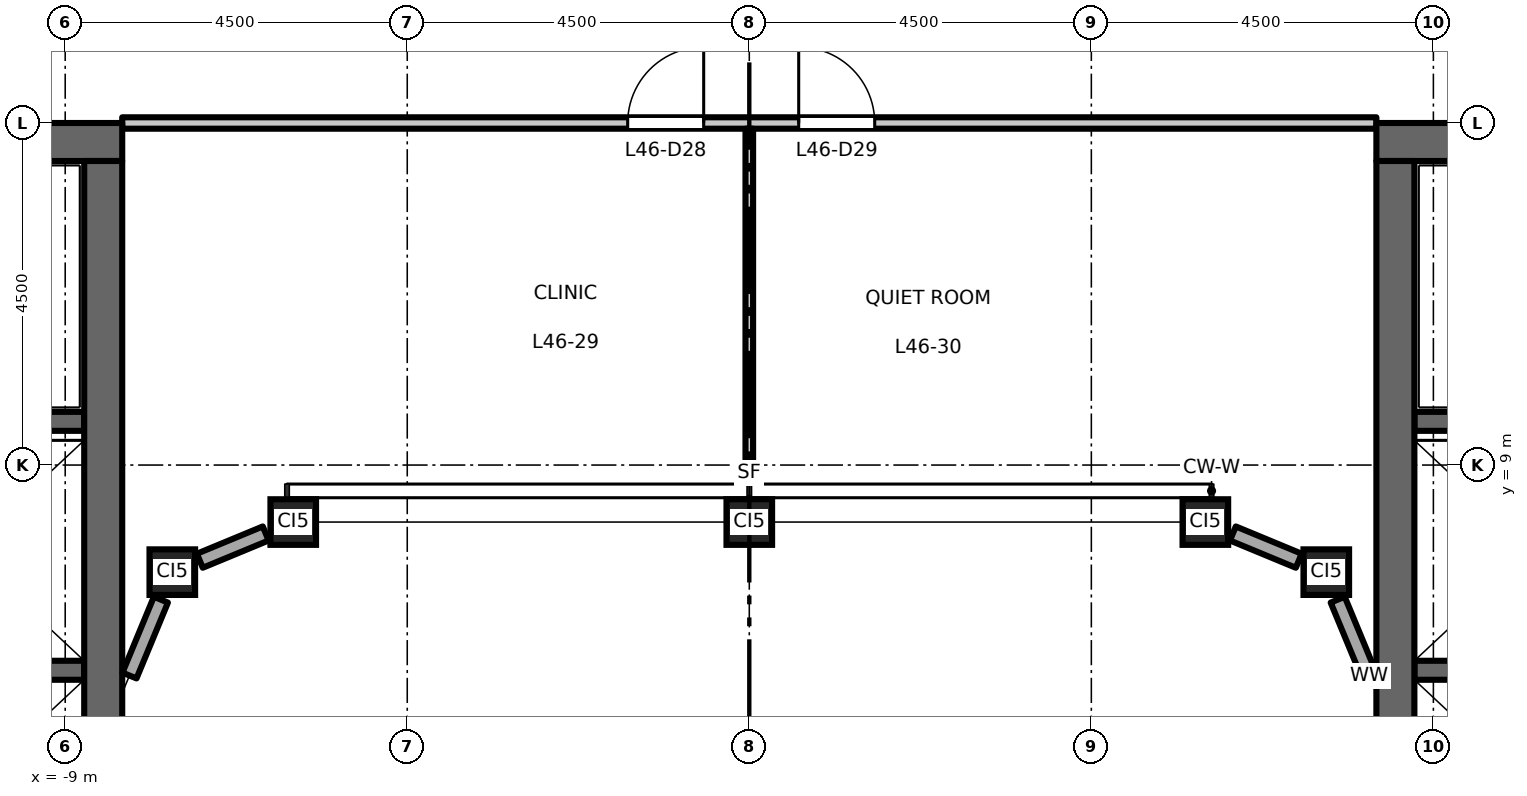
"""IFC4 building model, lengths in metres.
Left out: names, types, materials, properties, quantities, classifications, styles, units other than length and angle.
Written with IfcOpenShell. Run it as: python <this file> out.ifc"""

import sys

from ifc_helpers import new_model, si_unit, direction, frame, frame_2d, origin, origin_2d, place, context, subcontext, project, spatial, rectangle, hollow_rectangle, extrude, element, fill, save


model = new_model("IFC4")
c1 = context("Model", 3, precision=1e-05, world=origin(), true_north=direction((0.0, 1.0)))
c2 = subcontext(c1, "Body", "Model", "MODEL_VIEW")
j1 = project(units=[si_unit("LENGTHUNIT", "METRE"), si_unit("PLANEANGLEUNIT", "RADIAN")], contexts=[c1])
p1 = place(None, origin())
s1 = spatial("IfcSite", under=j1, at=p1, CompositionType="ELEMENT")
p2 = place(p1, origin())
s2 = spatial("IfcBuilding", under=s1, at=p2, CompositionType="ELEMENT")
p3 = place(p2, frame((0.0, 0.0, 215.2)))
s3 = spatial("IfcBuildingStorey", under=s2, at=p3, CompositionType="ELEMENT", Elevation=215.2)
for number, where, z_axis, x_axis in (
    (1, (-7.591, 7.591, 0.0), (0.0, 0.0, 1.0), (1.0, 0.0, 0.0)),
    (2, (-6.0, 8.25, 0.0), (0.0, 0.0, 1.0), (1.0, 0.0, 0.0)),
    (3, (0.0, 8.25, 0.0), (0.0, 0.0, 1.0), (1.0, 0.0, 0.0)),
    (4, (6.0, 8.25, 0.0), (0.0, 0.0, 1.0), (1.0, 0.0, 0.0)),
    (5, (7.591, 7.591, 0.0), (0.0, 0.0, 1.0), (1.0, 0.0, 0.0)),
):
    element("IfcColumn", number, at=place(p3, frame(where, z_axis=z_axis, x_axis=x_axis)), inside=s3, PredefinedType="COLUMN", context=c2, shape_type="SweptSolid", body=[
        extrude(hollow_rectangle(XDim=0.6, YDim=0.6, WallThickness=0.032, at=origin_2d()), origin(), (0.0, 0.0, 1.0), 4.5),
    ])
p4 = place(p3, frame((-8.75, 6.3, 0.0), z_axis=(0.0, 0.0, 1.0), x_axis=(-1.0, 0.0, 0.0)))
e6 = element("IfcWall", 6, at=p4, inside=s3, PredefinedType="SHEAR", context=c2, shape_type="SweptSolid", body=[
    extrude(rectangle(XDim=3.1, YDim=0.25, at=frame_2d((1.55, 0.0))), origin(), (0.0, 0.0, 1.0), 4.35),
])
p5 = place(p3, frame((-8.75, 9.575, 0.0), z_axis=(0.0, 0.0, 1.0), x_axis=(-1.0, 0.0, 0.0)))
e7 = element("IfcWall", 7, at=p5, inside=s3, PredefinedType="SHEAR", context=c2, shape_type="SweptSolid", body=[
    extrude(rectangle(XDim=8.0, YDim=0.25, at=frame_2d((4.0, 0.0))), origin(), (0.0, 0.0, 1.0), 4.35),
])
p6 = place(p5, frame((6.65, 0.0, 0.0)))
e8 = element("IfcOpeningElement", 8, at=p6, cuts=e7, PredefinedType="OPENING", context=c2, shape_type="SweptSolid", body=[
    extrude(rectangle(XDim=1.1, YDim=2.1, at=frame_2d((0.55, 1.05))), frame((0.0, 0.135, 0.0), z_axis=(0.0, -1.0, 0.0), x_axis=(1.0, 0.0, 0.0)), (0.0, 0.0, 1.0), 0.27),
])
p7 = place(p3, frame((-8.25, 13.25, 0.0), z_axis=(0.0, 0.0, 1.0), x_axis=(-1.0, 0.0, 0.0)))
e9 = element("IfcWall", 9, at=p7, inside=s3, PredefinedType="SHEAR", context=c2, shape_type="SweptSolid", body=[
    extrude(rectangle(XDim=13.5, YDim=0.5, at=frame_2d((6.75, 0.0))), origin(), (0.0, 0.0, 1.0), 4.35),
])
p8 = place(p3, frame((-8.5, -13.0, 0.0), z_axis=(0.0, 0.0, 1.0), x_axis=(0.0, 1.0, 0.0)))
e10 = element("IfcWall", 10, at=p8, inside=s3, PredefinedType="SHEAR", context=c2, shape_type="SweptSolid", body=[
    extrude(rectangle(XDim=26.0, YDim=0.5, at=frame_2d((13.0, 0.0))), origin(), (0.0, 0.0, 1.0), 4.35),
])
p9 = place(p3, frame((8.75, 6.3, 0.0), z_axis=(0.0, 0.0, 1.0), x_axis=(1.0, 0.0, 0.0)))
e11 = element("IfcWall", 11, at=p9, inside=s3, PredefinedType="SHEAR", context=c2, shape_type="SweptSolid", body=[
    extrude(rectangle(XDim=3.1, YDim=0.25, at=frame_2d((1.55, 0.0))), origin(), (0.0, 0.0, 1.0), 4.35),
])
p10 = place(p3, frame((8.75, 9.575, 0.0), z_axis=(0.0, 0.0, 1.0), x_axis=(1.0, 0.0, 0.0)))
e12 = element("IfcWall", 12, at=p10, inside=s3, PredefinedType="SHEAR", context=c2, shape_type="SweptSolid", body=[
    extrude(rectangle(XDim=8.0, YDim=0.25, at=frame_2d((4.0, 0.0))), origin(), (0.0, 0.0, 1.0), 4.35),
])
p11 = place(p10, frame((6.65, 0.0, 0.0)))
e13 = element("IfcOpeningElement", 13, at=p11, cuts=e12, PredefinedType="OPENING", context=c2, shape_type="SweptSolid", body=[
    extrude(rectangle(XDim=1.1, YDim=2.1, at=frame_2d((0.55, 1.05))), frame((0.0, 0.135, 0.0), z_axis=(0.0, -1.0, 0.0), x_axis=(1.0, 0.0, 0.0)), (0.0, 0.0, 1.0), 0.27),
])
p12 = place(p3, frame((8.25, 13.25, 0.0), z_axis=(0.0, 0.0, 1.0), x_axis=(1.0, 0.0, 0.0)))
e14 = element("IfcWall", 14, at=p12, inside=s3, PredefinedType="SHEAR", context=c2, shape_type="SweptSolid", body=[
    extrude(rectangle(XDim=13.5, YDim=0.5, at=frame_2d((6.75, 0.0))), origin(), (0.0, 0.0, 1.0), 4.35),
])
p13 = place(p3, frame((8.5, -13.0, 0.0), z_axis=(0.0, 0.0, 1.0), x_axis=(0.0, 1.0, 0.0)))
e15 = element("IfcWall", 15, at=p13, inside=s3, PredefinedType="SHEAR", context=c2, shape_type="SweptSolid", body=[
    extrude(rectangle(XDim=26.0, YDim=0.5, at=frame_2d((13.0, 0.0))), origin(), (0.0, 0.0, 1.0), 4.35),
])
p14 = place(p3, frame((8.154, 6.231, 0.0), z_axis=(0.0, 0.0, 1.0), x_axis=(-0.382704496366, 0.923870807235, 0.0)))
e16 = element("IfcWall", 16, at=p14, inside=s3, PredefinedType="STANDARD", context=c2, shape_type="SweptSolid", body=[
    extrude(rectangle(XDim=1.08, YDim=0.2, at=frame_2d((0.54, 0.0))), origin(), (0.0, 0.0, 1.0), 3.918),
])
for number, where, z_axis, x_axis in (
    (17, (7.229, 7.741, 0.0), (0.0, 0.0, 1.0), (-0.924, 0.383, 0.0)),
    (18, (-6.362, 8.1, 0.0), (0.0, 0.0, 1.0), (-0.924, -0.383, 0.0)),
):
    element("IfcWall", number, at=place(p3, frame(where, z_axis=z_axis, x_axis=x_axis)), inside=s3, PredefinedType="STANDARD", context=c2, shape_type="SweptSolid", body=[
        extrude(rectangle(XDim=0.938, YDim=0.2, at=frame_2d((0.469, 0.0))), origin(), (0.0, 0.0, 1.0), 3.918),
    ])
p15 = place(p3, frame((-7.741, 7.229, 0.0), z_axis=(0.0, 0.0, 1.0), x_axis=(-0.382704496366, -0.923870807235, 0.0)))
e19 = element("IfcWall", 19, at=p15, inside=s3, PredefinedType="STANDARD", context=c2, shape_type="SweptSolid", body=[
    extrude(rectangle(XDim=1.08, YDim=0.2, at=frame_2d((0.54, 0.0))), origin(), (0.0, 0.0, 1.0), 3.918),
])
p16 = place(p3, frame((-8.25, 13.5, 0.0), z_axis=(0.0, 0.0, 1.0), x_axis=(1.0, 0.0, 0.0)))
e20 = element("IfcWall", 20, at=p16, inside=s3, PredefinedType="PARTITIONING", context=c2, shape_type="SweptSolid", body=[
    extrude(rectangle(XDim=16.5, YDim=0.15, at=frame_2d((8.25, 0.0))), origin(), (0.0, 0.0, 1.0), 4.35),
])
p17 = place(p16, frame((6.65, 0.0, 0.0)))
e21 = element("IfcOpeningElement", 21, at=p17, cuts=e20, PredefinedType="OPENING", context=c2, shape_type="SweptSolid", body=[
    extrude(rectangle(XDim=1.0, YDim=2.1, at=frame_2d((0.5, 1.05))), frame((0.0, 0.085, 0.0), z_axis=(0.0, -1.0, 0.0), x_axis=(1.0, 0.0, 0.0)), (0.0, 0.0, 1.0), 0.17),
])
p18 = place(p16, frame((8.9, 0.0, 0.0)))
e22 = element("IfcOpeningElement", 22, at=p18, cuts=e20, PredefinedType="OPENING", context=c2, shape_type="SweptSolid", body=[
    extrude(rectangle(XDim=1.0, YDim=2.1, at=frame_2d((0.5, 1.05))), frame((0.0, 0.085, 0.0), z_axis=(0.0, -1.0, 0.0), x_axis=(1.0, 0.0, 0.0)), (0.0, 0.0, 1.0), 0.17),
])
p19 = place(p3, frame((0.0, 8.6, 0.0), z_axis=(0.0, 0.0, 1.0), x_axis=(0.0, 1.0, 0.0)))
e23 = element("IfcWall", 23, at=p19, inside=s3, PredefinedType="PARTITIONING", context=c2, shape_type="SweptSolid", body=[
    extrude(rectangle(XDim=4.825, YDim=0.1, at=frame_2d((2.413, 0.0))), origin(), (0.0, 0.0, 1.0), 3.55),
])
p20 = place(p17, origin())
e24 = element("IfcDoor", 24, at=p20, inside=s3, OperationType="SINGLE_SWING_RIGHT", PredefinedType="DOOR", context=c2, shape_type="SweptSolid", body=[
    extrude(rectangle(XDim=1.0, YDim=2.1, at=frame_2d((0.5, 1.05))), frame((0.0, 0.025, 0.0), z_axis=(0.0, -1.0, 0.0), x_axis=(1.0, 0.0, 0.0)), (0.0, 0.0, 1.0), 0.05),
])
fill(e21, e24)
p21 = place(p18, origin())
e25 = element("IfcDoor", 25, at=p21, inside=s3, OperationType="SINGLE_SWING_LEFT", PredefinedType="DOOR", context=c2, shape_type="SweptSolid", body=[
    extrude(rectangle(XDim=1.0, YDim=2.1, at=frame_2d((0.5, 1.05))), frame((0.0, 0.025, 0.0), z_axis=(0.0, -1.0, 0.0), x_axis=(1.0, 0.0, 0.0)), (0.0, 0.0, 1.0), 0.05),
])
fill(e22, e25)
save(model, sys.argv[1])
